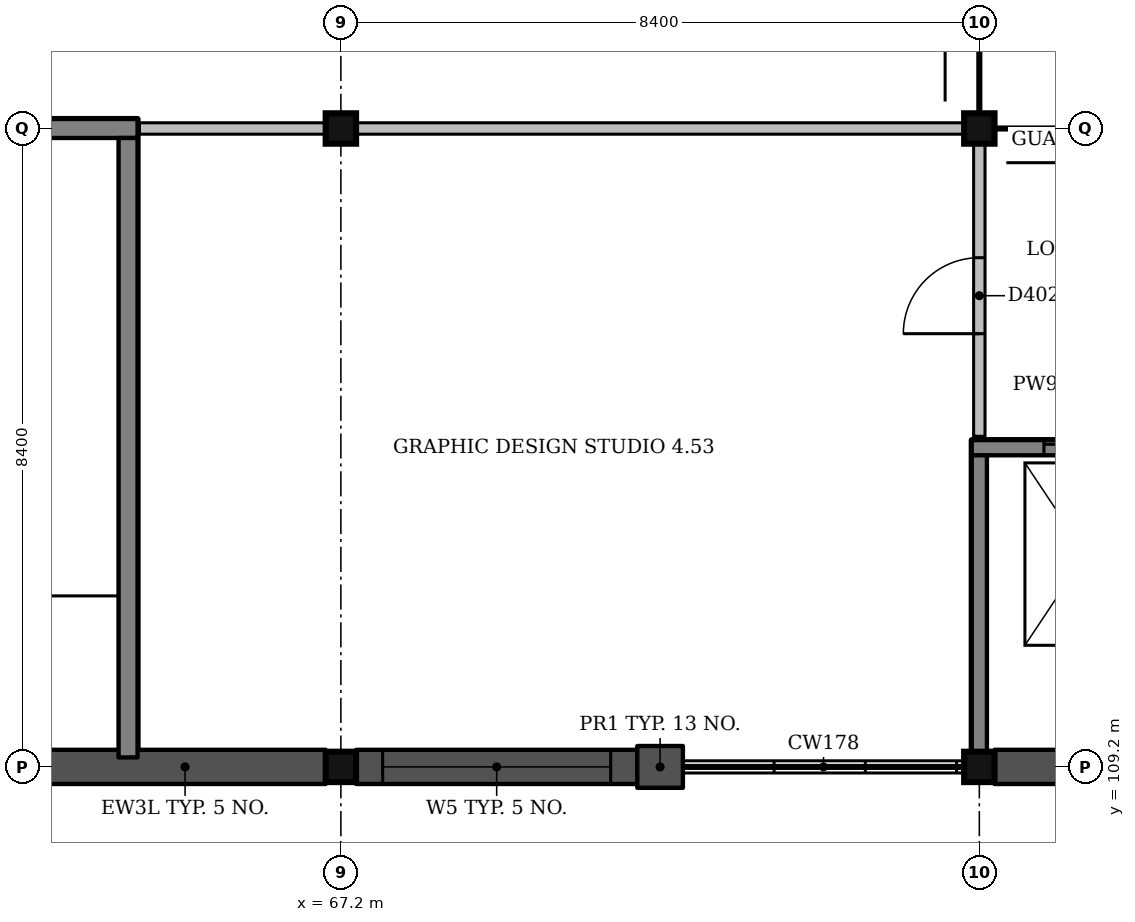
"""IFC4 building model, lengths in metres.
Left out: names, types, materials, properties, quantities, classifications, styles, units other than length and angle.
Written with IfcOpenShell. Run it as: python <this file> out.ifc"""

import sys

from ifc_helpers import new_model, si_unit, direction, frame, frame_2d, origin, origin_2d, place, context, subcontext, project, spatial, rectangle, extrude, element, fill, save


model = new_model("IFC4")
c1 = context("Model", 3, precision=1e-05, world=origin(), true_north=direction((0.0, 1.0)))
c2 = subcontext(c1, "Body", "Model", "MODEL_VIEW")
j1 = project(units=[si_unit("LENGTHUNIT", "METRE"), si_unit("PLANEANGLEUNIT", "RADIAN")], contexts=[c1])
p1 = place(None, origin())
s1 = spatial("IfcSite", under=j1, at=p1, CompositionType="ELEMENT")
p2 = place(p1, origin())
s2 = spatial("IfcBuilding", under=s1, at=p2, CompositionType="ELEMENT")
p3 = place(p2, frame((0.0, 0.0, 18.0)))
s3 = spatial("IfcBuildingStorey", under=s2, at=p3, CompositionType="ELEMENT", Elevation=18.0)
for number, where, z_axis, x_axis in (
    (1, (67.2, 109.2, 0.0), (0.0, 0.0, 1.0), (1.0, 0.0, 0.0)),
    (2, (67.2, 117.6, 0.0), (0.0, 0.0, 1.0), (1.0, 0.0, 0.0)),
    (3, (75.6, 109.2, 0.0), (0.0, 0.0, 1.0), (1.0, 0.0, 0.0)),
    (4, (75.6, 117.6, 0.0), (0.0, 0.0, 1.0), (1.0, 0.0, 0.0)),
):
    element("IfcColumn", number, at=place(p3, frame(where, z_axis=z_axis, x_axis=x_axis)), inside=s3, PredefinedType="COLUMN", context=c2, shape_type="SweptSolid", body=[
        extrude(rectangle(XDim=0.4, YDim=0.4, at=origin_2d()), origin(), (0.0, 0.0, 1.0), 4.5),
    ])
p4 = place(p3, frame((75.5, 113.4, 0.0), z_axis=(0.0, 0.0, 1.0), x_axis=(1.0, 0.0, 0.0)))
e5 = element("IfcWall", 5, at=p4, inside=s3, PredefinedType="SHEAR", context=c2, shape_type="SweptSolid", body=[
    extrude(rectangle(XDim=3.0, YDim=0.2, at=frame_2d((1.5, 0.0))), origin(), (0.0, 0.0, 1.0), 4.5),
])
p5 = place(p4, frame((0.95, 0.0, 0.0)))
e6 = element("IfcOpeningElement", 6, at=p5, cuts=e5, PredefinedType="OPENING", context=c2, shape_type="SweptSolid", body=[
    extrude(rectangle(XDim=1.1, YDim=2.1, at=frame_2d((0.55, 1.05))), frame((0.0, 0.11, 0.0), z_axis=(0.0, -1.0, 0.0), x_axis=(1.0, 0.0, 0.0)), (0.0, 0.0, 1.0), 0.22),
])
p6 = place(p3, frame((75.6, 109.4, 0.0), z_axis=(0.0, 0.0, 1.0), x_axis=(0.0, 1.0, 0.0)))
e7 = element("IfcWall", 7, at=p6, inside=s3, PredefinedType="SHEAR", context=c2, shape_type="SweptSolid", body=[
    extrude(rectangle(XDim=3.9, YDim=0.2, at=frame_2d((1.95, 0.0))), origin(), (0.0, 0.0, 1.0), 4.5),
])
p7 = place(p3, frame((59.0, 117.6, 0.0), z_axis=(0.0, 0.0, 1.0), x_axis=(1.0, 0.0, 0.0)))
e8 = element("IfcWall", 8, at=p7, inside=s3, PredefinedType="SHEAR", context=c2, shape_type="SweptSolid", body=[
    extrude(rectangle(XDim=5.525, YDim=0.25, at=frame_2d((2.762, 0.0))), origin(), (0.0, 0.0, 1.0), 4.2),
])
p8 = place(p3, frame((64.4, 109.325, 0.0), z_axis=(0.0, 0.0, 1.0), x_axis=(0.0, 1.0, 0.0)))
e9 = element("IfcWall", 9, at=p8, inside=s3, PredefinedType="SHEAR", context=c2, shape_type="SweptSolid", body=[
    extrude(rectangle(XDim=8.15, YDim=0.25, at=frame_2d((4.075, 0.0))), origin(), (0.0, 0.0, 1.0), 4.2),
])
p9 = place(p3, frame((63.3, 109.2, 0.0), z_axis=(0.0, 0.0, 1.0), x_axis=(1.0, 0.0, 0.0)))
e10 = element("IfcWall", 10, at=p9, inside=s3, PredefinedType="SOLIDWALL", context=c2, shape_type="SweptSolid", body=[
    extrude(rectangle(XDim=3.7, YDim=0.45, at=frame_2d((1.85, 0.0))), origin(), (0.0, 0.0, 1.0), 3.6),
])
p10 = place(p3, frame((67.4, 109.2, 0.0), z_axis=(0.0, 0.0, 1.0), x_axis=(1.0, 0.0, 0.0)))
e11 = element("IfcWall", 11, at=p10, inside=s3, PredefinedType="SOLIDWALL", context=c2, shape_type="SweptSolid", body=[
    extrude(rectangle(XDim=3.7, YDim=0.45, at=frame_2d((1.85, 0.0))), origin(), (0.0, 0.0, 1.0), 3.6),
])
p11 = place(p10, frame((0.35, 0.0, 0.9)))
e12 = element("IfcOpeningElement", 12, at=p11, cuts=e11, PredefinedType="OPENING", context=c2, shape_type="SweptSolid", body=[
    extrude(rectangle(XDim=3.0, YDim=2.1, at=frame_2d((1.5, 1.05))), frame((0.0, 0.235, 0.0), z_axis=(0.0, -1.0, 0.0), x_axis=(1.0, 0.0, 0.0)), (0.0, 0.0, 1.0), 0.47),
])
p12 = place(p3, frame((71.1, 109.2, 0.0), z_axis=(0.0, 0.0, 1.0), x_axis=(1.0, 0.0, 0.0)))
e13 = element("IfcWall", 13, at=p12, inside=s3, PredefinedType="SOLIDWALL", context=c2, shape_type="SweptSolid", body=[
    extrude(rectangle(XDim=0.6, YDim=0.55, at=frame_2d((0.3, 0.0))), origin(), (0.0, 0.0, 1.0), 3.6),
])
p13 = place(p3, frame((75.8, 109.2, 0.0), z_axis=(0.0, 0.0, 1.0), x_axis=(1.0, 0.0, 0.0)))
e14 = element("IfcWall", 14, at=p13, inside=s3, PredefinedType="SOLIDWALL", context=c2, shape_type="SweptSolid", body=[
    extrude(rectangle(XDim=3.7, YDim=0.45, at=frame_2d((1.85, 0.0))), origin(), (0.0, 0.0, 1.0), 3.45),
])
p14 = place(p3, frame((64.55, 117.6, 0.0), z_axis=(0.0, 0.0, 1.0), x_axis=(1.0, 0.0, 0.0)))
e15 = element("IfcWall", 15, at=p14, inside=s3, PredefinedType="PARTITIONING", context=c2, shape_type="SweptSolid", body=[
    extrude(rectangle(XDim=2.45, YDim=0.15, at=frame_2d((1.225, 0.0))), origin(), (0.0, 0.0, 1.0), 3.6),
])
p15 = place(p3, frame((67.4, 117.6, 0.0), z_axis=(0.0, 0.0, 1.0), x_axis=(1.0, 0.0, 0.0)))
e16 = element("IfcWall", 16, at=p15, inside=s3, PredefinedType="PARTITIONING", context=c2, shape_type="SweptSolid", body=[
    extrude(rectangle(XDim=8.0, YDim=0.15, at=frame_2d((4.0, 0.0))), origin(), (0.0, 0.0, 1.0), 3.6),
])
p16 = place(p3, frame((75.6, 113.55, 0.0), z_axis=(0.0, 0.0, 1.0), x_axis=(0.0, 1.0, 0.0)))
e17 = element("IfcWall", 17, at=p16, inside=s3, PredefinedType="PARTITIONING", context=c2, shape_type="SweptSolid", body=[
    extrude(rectangle(XDim=3.85, YDim=0.15, at=frame_2d((1.925, 0.0))), origin(), (0.0, 0.0, 1.0), 3.45),
])
p17 = place(p16, frame((1.35, 0.0, 0.0)))
e18 = element("IfcOpeningElement", 18, at=p17, cuts=e17, PredefinedType="OPENING", context=c2, shape_type="SweptSolid", body=[
    extrude(rectangle(XDim=1.0, YDim=2.1, at=frame_2d((0.5, 1.05))), frame((0.0, 0.085, 0.0), z_axis=(0.0, -1.0, 0.0), x_axis=(1.0, 0.0, 0.0)), (0.0, 0.0, 1.0), 0.17),
])
p18 = place(p11, origin())
e19 = element("IfcWindow", 19, at=p18, inside=s3, PartitioningType="SINGLE_PANEL", PredefinedType="WINDOW", context=c2, shape_type="SweptSolid", body=[
    extrude(rectangle(XDim=3.0, YDim=2.1, at=frame_2d((1.5, 1.05))), frame((0.0, 0.135, 0.0), z_axis=(0.0, -1.0, 0.0), x_axis=(1.0, 0.0, 0.0)), (0.0, 0.0, 1.0), 0.06),
])
fill(e12, e19)
p19 = place(p17, origin())
e20 = element("IfcDoor", 20, at=p19, inside=s3, OperationType="SINGLE_SWING_LEFT", PredefinedType="DOOR", context=c2, shape_type="SweptSolid", body=[
    extrude(rectangle(XDim=1.0, YDim=2.1, at=frame_2d((0.5, 1.05))), frame((0.0, 0.025, 0.0), z_axis=(0.0, -1.0, 0.0), x_axis=(1.0, 0.0, 0.0)), (0.0, 0.0, 1.0), 0.05),
])
fill(e18, e20)
p20 = place(p5, origin())
e21 = element("IfcDoor", 21, at=p20, inside=s3, OperationType="SLIDING_TO_LEFT", PredefinedType="DOOR", context=c2, shape_type="SweptSolid", body=[
    extrude(rectangle(XDim=1.1, YDim=2.1, at=frame_2d((0.55, 1.05))), frame((0.0, 0.025, 0.0), z_axis=(0.0, -1.0, 0.0), x_axis=(1.0, 0.0, 0.0)), (0.0, 0.0, 1.0), 0.05),
])
fill(e6, e21)
save(model, sys.argv[1])
